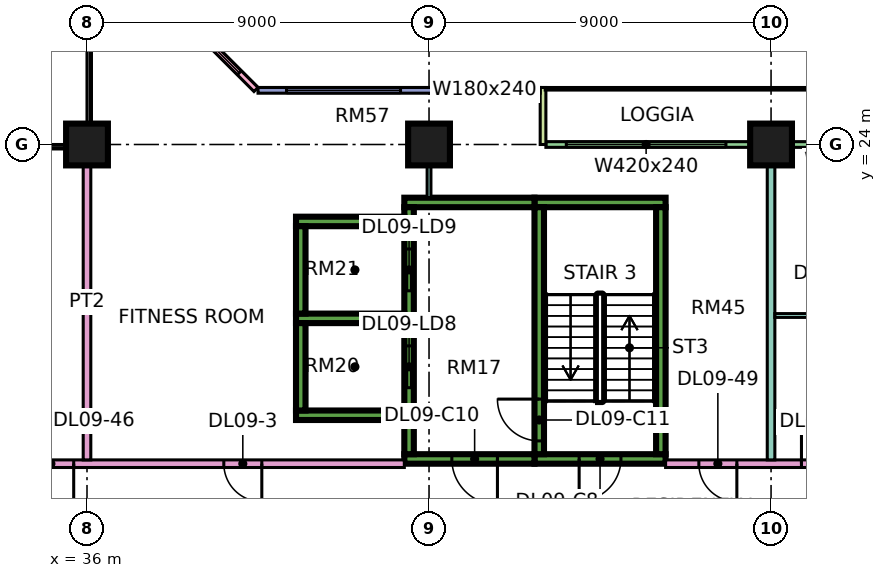
"""IFC4 building model, lengths in metres.
Left out: names, types, materials, properties, quantities, classifications, styles, units other than length and angle.
Written with IfcOpenShell. Run it as: python <this file> out.ifc"""

import sys

from ifc_helpers import new_model, si_unit, direction, frame, frame_2d, origin, origin_2d, place, context, subcontext, project, spatial, rectangle, extrude, element, fill, save


model = new_model("IFC4")
c1 = context("Model", 3, precision=1e-05, world=origin(), true_north=direction((0.0, 1.0)))
c2 = subcontext(c1, "Body", "Model", "MODEL_VIEW")
j1 = project(units=[si_unit("LENGTHUNIT", "METRE"), si_unit("PLANEANGLEUNIT", "RADIAN")], contexts=[c1])
p1 = place(None, origin())
s1 = spatial("IfcSite", under=j1, at=p1, CompositionType="ELEMENT")
p2 = place(p1, origin())
s2 = spatial("IfcBuilding", under=s1, at=p2, CompositionType="ELEMENT")
p3 = place(p2, frame((0.0, 0.0, 48.9)))
s3 = spatial("IfcBuildingStorey", under=s2, at=p3, CompositionType="ELEMENT", Elevation=48.9)
for number, where, z_axis, x_axis in (
    (1, (36.0, 24.0, 0.0), (0.0, 0.0, 1.0), (1.0, 0.0, 0.0)),
    (2, (45.0, 24.0, 0.0), (0.0, 0.0, 1.0), (1.0, 0.0, 0.0)),
    (3, (54.0, 24.0, 0.0), (0.0, 0.0, 1.0), (1.0, 0.0, 0.0)),
):
    element("IfcColumn", number, at=place(p3, frame(where, z_axis=z_axis, x_axis=x_axis)), inside=s3, PredefinedType="COLUMN", context=c2, shape_type="SweptSolid", body=[
        extrude(rectangle(XDim=1.1, YDim=1.1, at=origin_2d()), origin(), (0.0, 0.0, 1.0), 3.75),
    ])
p4 = place(p3, frame((47.775, 15.725, 0.0), z_axis=(0.0, 0.0, 1.0), x_axis=(1.0, 0.0, 0.0)))
e4 = element("IfcWall", 4, at=p4, inside=s3, PredefinedType="SHEAR", context=c2, shape_type="SweptSolid", body=[
    extrude(rectangle(XDim=3.45, YDim=0.25, at=frame_2d((1.725, 0.0))), origin(), (0.0, 0.0, 1.0), 3.75),
])
p5 = place(p4, frame((1.175, 0.0, 0.0)))
e5 = element("IfcOpeningElement", 5, at=p5, cuts=e4, PredefinedType="OPENING", context=c2, shape_type="SweptSolid", body=[
    extrude(rectangle(XDim=1.1, YDim=2.2, at=frame_2d((0.55, 1.1))), frame((0.0, 0.135, 0.0), z_axis=(0.0, -1.0, 0.0), x_axis=(1.0, 0.0, 0.0)), (0.0, 0.0, 1.0), 0.27),
])
p6 = place(p3, frame((47.775, 22.475, 0.0), z_axis=(0.0, 0.0, 1.0), x_axis=(1.0, 0.0, 0.0)))
e6 = element("IfcWall", 6, at=p6, inside=s3, PredefinedType="SHEAR", context=c2, shape_type="SweptSolid", body=[
    extrude(rectangle(XDim=3.45, YDim=0.25, at=frame_2d((1.725, 0.0))), origin(), (0.0, 0.0, 1.0), 3.75),
])
p7 = place(p3, frame((47.9, 15.85, 0.0), z_axis=(0.0, 0.0, 1.0), x_axis=(0.0, 1.0, 0.0)))
e7 = element("IfcWall", 7, at=p7, inside=s3, PredefinedType="SHEAR", context=c2, shape_type="SweptSolid", body=[
    extrude(rectangle(XDim=6.5, YDim=0.25, at=frame_2d((3.25, 0.0))), origin(), (0.0, 0.0, 1.0), 3.75),
])
p8 = place(p7, frame((0.35, 0.0, 0.0)))
e8 = element("IfcOpeningElement", 8, at=p8, cuts=e7, PredefinedType="OPENING", context=c2, shape_type="SweptSolid", body=[
    extrude(rectangle(XDim=1.1, YDim=2.2, at=frame_2d((0.55, 1.1))), frame((0.0, 0.135, 0.0), z_axis=(0.0, -1.0, 0.0), x_axis=(1.0, 0.0, 0.0)), (0.0, 0.0, 1.0), 0.27),
])
p9 = place(p3, frame((51.1, 15.85, 0.0), z_axis=(0.0, 0.0, 1.0), x_axis=(0.0, 1.0, 0.0)))
e9 = element("IfcWall", 9, at=p9, inside=s3, PredefinedType="SHEAR", context=c2, shape_type="SweptSolid", body=[
    extrude(rectangle(XDim=6.5, YDim=0.25, at=frame_2d((3.25, 0.0))), origin(), (0.0, 0.0, 1.0), 3.75),
])
p10 = place(p3, frame((44.35, 15.725, 0.0), z_axis=(0.0, 0.0, 1.0), x_axis=(1.0, 0.0, 0.0)))
e10 = element("IfcWall", 10, at=p10, inside=s3, PredefinedType="SHEAR", context=c2, shape_type="SweptSolid", body=[
    extrude(rectangle(XDim=3.425, YDim=0.25, at=frame_2d((1.712, 0.0))), origin(), (0.0, 0.0, 1.0), 3.75),
])
p11 = place(p10, frame((1.25, 0.0, 0.0)))
e11 = element("IfcOpeningElement", 11, at=p11, cuts=e10, PredefinedType="OPENING", context=c2, shape_type="SweptSolid", body=[
    extrude(rectangle(XDim=1.2, YDim=2.2, at=frame_2d((0.6, 1.1))), frame((0.0, 0.135, 0.0), z_axis=(0.0, -1.0, 0.0), x_axis=(1.0, 0.0, 0.0)), (0.0, 0.0, 1.0), 0.27),
])
p12 = place(p3, frame((44.35, 22.475, 0.0), z_axis=(0.0, 0.0, 1.0), x_axis=(1.0, 0.0, 0.0)))
e12 = element("IfcWall", 12, at=p12, inside=s3, PredefinedType="SHEAR", context=c2, shape_type="SweptSolid", body=[
    extrude(rectangle(XDim=3.425, YDim=0.25, at=frame_2d((1.712, 0.0))), origin(), (0.0, 0.0, 1.0), 3.75),
])
p13 = place(p3, frame((44.475, 15.85, 0.0), z_axis=(0.0, 0.0, 1.0), x_axis=(0.0, 1.0, 0.0)))
e13 = element("IfcWall", 13, at=p13, inside=s3, PredefinedType="SHEAR", context=c2, shape_type="SweptSolid", body=[
    extrude(rectangle(XDim=6.5, YDim=0.25, at=frame_2d((3.25, 0.0))), origin(), (0.0, 0.0, 1.0), 3.75),
])
p14 = place(p13, frame((1.75, 0.0, 0.0)))
e14 = element("IfcOpeningElement", 14, at=p14, cuts=e13, PredefinedType="OPENING", context=c2, shape_type="SweptSolid", body=[
    extrude(rectangle(XDim=1.1, YDim=2.2, at=frame_2d((0.55, 1.1))), frame((0.0, 0.135, 0.0), z_axis=(0.0, -1.0, 0.0), x_axis=(1.0, 0.0, 0.0)), (0.0, 0.0, 1.0), 0.27),
])
p15 = place(p13, frame((4.3, 0.0, 0.0)))
e15 = element("IfcOpeningElement", 15, at=p15, cuts=e13, PredefinedType="OPENING", context=c2, shape_type="SweptSolid", body=[
    extrude(rectangle(XDim=1.1, YDim=2.2, at=frame_2d((0.55, 1.1))), frame((0.0, 0.135, 0.0), z_axis=(0.0, -1.0, 0.0), x_axis=(1.0, 0.0, 0.0)), (0.0, 0.0, 1.0), 0.27),
])
for number, where, z_axis, x_axis in (
    (16, (41.5, 16.875, 0.0), (0.0, 0.0, 1.0), (1.0, 0.0, 0.0)),
    (17, (41.5, 19.425, 0.0), (0.0, 0.0, 1.0), (1.0, 0.0, 0.0)),
    (18, (41.5, 21.975, 0.0), (0.0, 0.0, 1.0), (1.0, 0.0, 0.0)),
):
    element("IfcWall", number, at=place(p3, frame(where, z_axis=z_axis, x_axis=x_axis)), inside=s3, PredefinedType="SHEAR", context=c2, shape_type="SweptSolid", body=[
        extrude(rectangle(XDim=2.85, YDim=0.25, at=frame_2d((1.425, 0.0))), origin(), (0.0, 0.0, 1.0), 3.75),
    ])
for number, where, z_axis, x_axis in (
    (19, (41.625, 17.0, 0.0), (0.0, 0.0, 1.0), (0.0, 1.0, 0.0)),
    (20, (41.625, 19.55, 0.0), (0.0, 0.0, 1.0), (0.0, 1.0, 0.0)),
):
    element("IfcWall", number, at=place(p3, frame(where, z_axis=z_axis, x_axis=x_axis)), inside=s3, PredefinedType="SHEAR", context=c2, shape_type="SweptSolid", body=[
        extrude(rectangle(XDim=2.3, YDim=0.25, at=frame_2d((1.15, 0.0))), origin(), (0.0, 0.0, 1.0), 3.75),
    ])
p16 = place(p3, frame((59.925, 24.0, 0.0), z_axis=(0.0, 0.0, 1.0), x_axis=(-1.0, 0.0, 0.0)))
e21 = element("IfcWall", 21, at=p16, inside=s3, PredefinedType="SOLIDWALL", context=c2, shape_type="SweptSolid", body=[
    extrude(rectangle(XDim=11.85, YDim=0.15, at=frame_2d((5.925, 0.0))), origin(), (0.0, 0.0, 1.0), 3.35),
])
p17 = place(p16, frame((0.562, 0.0, 0.45)))
e22 = element("IfcOpeningElement", 22, at=p17, cuts=e21, PredefinedType="OPENING", context=c2, shape_type="SweptSolid", body=[
    extrude(rectangle(XDim=1.8, YDim=2.4, at=frame_2d((0.9, 1.2))), frame((0.0, 0.085, 0.0), z_axis=(0.0, -1.0, 0.0), x_axis=(1.0, 0.0, 0.0)), (0.0, 0.0, 1.0), 0.17),
])
p18 = place(p16, frame((3.5, 0.0, 0.45)))
e23 = element("IfcOpeningElement", 23, at=p18, cuts=e21, PredefinedType="OPENING", context=c2, shape_type="SweptSolid", body=[
    extrude(rectangle(XDim=1.2, YDim=2.4, at=frame_2d((0.6, 1.2))), frame((0.0, 0.085, 0.0), z_axis=(0.0, -1.0, 0.0), x_axis=(1.0, 0.0, 0.0)), (0.0, 0.0, 1.0), 0.17),
])
p19 = place(p16, frame((7.113, 0.0, 0.45)))
e24 = element("IfcOpeningElement", 24, at=p19, cuts=e21, PredefinedType="OPENING", context=c2, shape_type="SweptSolid", body=[
    extrude(rectangle(XDim=4.2, YDim=2.4, at=frame_2d((2.1, 1.2))), frame((0.0, 0.085, 0.0), z_axis=(0.0, -1.0, 0.0), x_axis=(1.0, 0.0, 0.0)), (0.0, 0.0, 1.0), 0.17),
])
p20 = place(p3, frame((48.0, 25.5, 0.0), z_axis=(0.0, 0.0, 1.0), x_axis=(0.0, -1.0, 0.0)))
e25 = element("IfcWall", 25, at=p20, inside=s3, PredefinedType="SOLIDWALL", context=c2, shape_type="SweptSolid", body=[
    extrude(rectangle(XDim=1.5, YDim=0.15, at=frame_2d((0.75, 0.0))), origin(), (0.0, 0.0, 1.0), 3.35),
])
p21 = place(p3, frame((47.925, 25.425, 0.0), z_axis=(0.0, 0.0, 1.0), x_axis=(-1.0, 0.0, 0.0)))
e26 = element("IfcWall", 26, at=p21, inside=s3, PredefinedType="SOLIDWALL", context=c2, shape_type="SweptSolid", body=[
    extrude(rectangle(XDim=7.425, YDim=0.15, at=frame_2d((3.712, 0.0))), origin(), (0.0, 0.0, 1.0), 3.35),
])
p22 = place(p21, frame((0.562, 0.0, 0.45)))
e27 = element("IfcOpeningElement", 27, at=p22, cuts=e26, PredefinedType="OPENING", context=c2, shape_type="SweptSolid", body=[
    extrude(rectangle(XDim=1.8, YDim=2.4, at=frame_2d((0.9, 1.2))), frame((0.0, 0.085, 0.0), z_axis=(0.0, -1.0, 0.0), x_axis=(1.0, 0.0, 0.0)), (0.0, 0.0, 1.0), 0.17),
])
p23 = place(p21, frame((3.675, 0.0, 0.45)))
e28 = element("IfcOpeningElement", 28, at=p23, cuts=e26, PredefinedType="OPENING", context=c2, shape_type="SweptSolid", body=[
    extrude(rectangle(XDim=3.0, YDim=2.4, at=frame_2d((1.5, 1.2))), frame((0.0, 0.085, 0.0), z_axis=(0.0, -1.0, 0.0), x_axis=(1.0, 0.0, 0.0)), (0.0, 0.0, 1.0), 0.17),
])
p24 = place(p3, frame((40.447, 25.447, 0.0), z_axis=(0.0, 0.0, 1.0), x_axis=(-0.707106781187, 0.707106781187, 0.0)))
e29 = element("IfcWall", 29, at=p24, inside=s3, PredefinedType="SOLIDWALL", context=c2, shape_type="SweptSolid", body=[
    extrude(rectangle(XDim=4.243, YDim=0.15, at=frame_2d((2.121, 0.0))), origin(), (0.0, 0.0, 1.0), 3.35),
])
p25 = place(p24, frame((0.621, 0.0, 0.45)))
e30 = element("IfcOpeningElement", 30, at=p25, cuts=e29, PredefinedType="OPENING", context=c2, shape_type="SweptSolid", body=[
    extrude(rectangle(XDim=3.0, YDim=2.4, at=frame_2d((1.5, 1.2))), frame((0.0, 0.085, 0.0), z_axis=(0.0, -1.0, 0.0), x_axis=(1.0, 0.0, 0.0)), (0.0, 0.0, 1.0), 0.17),
])
p26 = place(p3, frame((34.0, 15.6, 0.0), z_axis=(0.0, 0.0, 1.0), x_axis=(1.0, 0.0, 0.0)))
e31 = element("IfcWall", 31, at=p26, inside=s3, PredefinedType="PARTITIONING", context=c2, shape_type="SweptSolid", body=[
    extrude(rectangle(XDim=10.35, YDim=0.2, at=frame_2d((5.175, 0.0))), origin(), (0.0, 0.0, 1.0), 3.35),
])
p27 = place(p26, frame((5.6, 0.0, 0.0)))
e32 = element("IfcOpeningElement", 32, at=p27, cuts=e31, PredefinedType="OPENING", context=c2, shape_type="SweptSolid", body=[
    extrude(rectangle(XDim=1.0, YDim=2.1, at=frame_2d((0.5, 1.05))), frame((0.0, 0.11, 0.0), z_axis=(0.0, -1.0, 0.0), x_axis=(1.0, 0.0, 0.0)), (0.0, 0.0, 1.0), 0.22),
])
p28 = place(p26, frame((0.45, 0.0, 0.0)))
e33 = element("IfcOpeningElement", 33, at=p28, cuts=e31, PredefinedType="OPENING", context=c2, shape_type="SweptSolid", body=[
    extrude(rectangle(XDim=1.2, YDim=2.1, at=frame_2d((0.6, 1.05))), frame((0.0, 0.11, 0.0), z_axis=(0.0, -1.0, 0.0), x_axis=(1.0, 0.0, 0.0)), (0.0, 0.0, 1.0), 0.22),
])
p29 = place(p3, frame((36.0, 15.7, 0.0), z_axis=(0.0, 0.0, 1.0), x_axis=(0.0, 1.0, 0.0)))
e34 = element("IfcWall", 34, at=p29, inside=s3, PredefinedType="PARTITIONING", context=c2, shape_type="SweptSolid", body=[
    extrude(rectangle(XDim=8.3, YDim=0.2, at=frame_2d((4.15, 0.0))), origin(), (0.0, 0.0, 1.0), 3.35),
])
p30 = place(p3, frame((45.0, 22.6, 0.0), z_axis=(0.0, 0.0, 1.0), x_axis=(0.0, 1.0, 0.0)))
e35 = element("IfcWall", 35, at=p30, inside=s3, PredefinedType="PARTITIONING", context=c2, shape_type="SweptSolid", body=[
    extrude(rectangle(XDim=1.4, YDim=0.1, at=frame_2d((0.7, 0.0))), origin(), (0.0, 0.0, 1.0), 3.35),
])
p31 = place(p3, frame((51.225, 15.6, 0.0), z_axis=(0.0, 0.0, 1.0), x_axis=(1.0, 0.0, 0.0)))
e36 = element("IfcWall", 36, at=p31, inside=s3, PredefinedType="PARTITIONING", context=c2, shape_type="SweptSolid", body=[
    extrude(rectangle(XDim=22.125, YDim=0.2, at=frame_2d((11.062, 0.0))), origin(), (0.0, 0.0, 1.0), 3.35),
])
p32 = place(p31, frame((3.575, 0.0, 0.0)))
e37 = element("IfcOpeningElement", 37, at=p32, cuts=e36, PredefinedType="OPENING", context=c2, shape_type="SweptSolid", body=[
    extrude(rectangle(XDim=1.0, YDim=2.1, at=frame_2d((0.5, 1.05))), frame((0.0, 0.11, 0.0), z_axis=(0.0, -1.0, 0.0), x_axis=(1.0, 0.0, 0.0)), (0.0, 0.0, 1.0), 0.22),
])
p33 = place(p31, frame((0.875, 0.0, 0.0)))
e38 = element("IfcOpeningElement", 38, at=p33, cuts=e36, PredefinedType="OPENING", context=c2, shape_type="SweptSolid", body=[
    extrude(rectangle(XDim=1.0, YDim=2.1, at=frame_2d((0.5, 1.05))), frame((0.0, 0.11, 0.0), z_axis=(0.0, -1.0, 0.0), x_axis=(1.0, 0.0, 0.0)), (0.0, 0.0, 1.0), 0.22),
])
p34 = place(p3, frame((54.0, 15.7, 0.0), z_axis=(0.0, 0.0, 1.0), x_axis=(0.0, 1.0, 0.0)))
e39 = element("IfcWall", 39, at=p34, inside=s3, PredefinedType="PARTITIONING", context=c2, shape_type="SweptSolid", body=[
    extrude(rectangle(XDim=8.226, YDim=0.2, at=frame_2d((4.113, 0.0))), origin(), (0.0, 0.0, 1.0), 3.35),
])
p35 = place(p3, frame((54.1, 19.5, 0.0), z_axis=(0.0, 0.0, 1.0), x_axis=(1.0, 0.0, 0.0)))
e40 = element("IfcWall", 40, at=p35, inside=s3, PredefinedType="PARTITIONING", context=c2, shape_type="SweptSolid", body=[
    extrude(rectangle(XDim=8.95, YDim=0.1, at=frame_2d((4.475, 0.0))), origin(), (0.0, 0.0, 1.0), 3.35),
])
p36 = place(p35, frame((0.95, 0.0, 0.0)))
e41 = element("IfcOpeningElement", 41, at=p36, cuts=e40, PredefinedType="OPENING", context=c2, shape_type="SweptSolid", body=[
    extrude(rectangle(XDim=0.9, YDim=2.1, at=frame_2d((0.45, 1.05))), frame((0.0, 0.06, 0.0), z_axis=(0.0, -1.0, 0.0), x_axis=(1.0, 0.0, 0.0)), (0.0, 0.0, 1.0), 0.12),
])
p37 = place(p35, frame((3.95, 0.0, 0.0)))
e42 = element("IfcOpeningElement", 42, at=p37, cuts=e40, PredefinedType="OPENING", context=c2, shape_type="SweptSolid", body=[
    extrude(rectangle(XDim=0.9, YDim=2.1, at=frame_2d((0.45, 1.05))), frame((0.0, 0.06, 0.0), z_axis=(0.0, -1.0, 0.0), x_axis=(1.0, 0.0, 0.0)), (0.0, 0.0, 1.0), 0.12),
])
p38 = place(p35, frame((6.95, 0.0, 0.0)))
e43 = element("IfcOpeningElement", 43, at=p38, cuts=e40, PredefinedType="OPENING", context=c2, shape_type="SweptSolid", body=[
    extrude(rectangle(XDim=0.9, YDim=2.1, at=frame_2d((0.45, 1.05))), frame((0.0, 0.06, 0.0), z_axis=(0.0, -1.0, 0.0), x_axis=(1.0, 0.0, 0.0)), (0.0, 0.0, 1.0), 0.12),
])
p39 = place(p19, origin())
e44 = element("IfcWindow", 44, at=p39, inside=s3, PartitioningType="SINGLE_PANEL", PredefinedType="WINDOW", context=c2, shape_type="SweptSolid", body=[
    extrude(rectangle(XDim=4.2, YDim=2.4, at=frame_2d((2.1, 1.2))), frame((0.0, 0.03, 0.0), z_axis=(0.0, -1.0, 0.0), x_axis=(1.0, 0.0, 0.0)), (0.0, 0.0, 1.0), 0.06),
])
fill(e24, e44)
p40 = place(p22, origin())
e45 = element("IfcWindow", 45, at=p40, inside=s3, PartitioningType="SINGLE_PANEL", PredefinedType="WINDOW", context=c2, shape_type="SweptSolid", body=[
    extrude(rectangle(XDim=1.8, YDim=2.4, at=frame_2d((0.9, 1.2))), frame((0.0, 0.03, 0.0), z_axis=(0.0, -1.0, 0.0), x_axis=(1.0, 0.0, 0.0)), (0.0, 0.0, 1.0), 0.06),
])
fill(e27, e45)
p41 = place(p23, origin())
e46 = element("IfcWindow", 46, at=p41, inside=s3, PartitioningType="SINGLE_PANEL", PredefinedType="WINDOW", context=c2, shape_type="SweptSolid", body=[
    extrude(rectangle(XDim=3.0, YDim=2.4, at=frame_2d((1.5, 1.2))), frame((0.0, 0.03, 0.0), z_axis=(0.0, -1.0, 0.0), x_axis=(1.0, 0.0, 0.0)), (0.0, 0.0, 1.0), 0.06),
])
fill(e28, e46)
p42 = place(p25, origin())
e47 = element("IfcWindow", 47, at=p42, inside=s3, PartitioningType="SINGLE_PANEL", PredefinedType="WINDOW", context=c2, shape_type="SweptSolid", body=[
    extrude(rectangle(XDim=3.0, YDim=2.4, at=frame_2d((1.5, 1.2))), frame((0.0, 0.03, 0.0), z_axis=(0.0, -1.0, 0.0), x_axis=(1.0, 0.0, 0.0)), (0.0, 0.0, 1.0), 0.06),
])
fill(e30, e47)
p43 = place(p5, frame((1.1, 0.0, 0.0), z_axis=(0.0, 0.0, 1.0), x_axis=(-1.0, 0.0, 0.0)))
e48 = element("IfcDoor", 48, at=p43, inside=s3, OperationType="SINGLE_SWING_LEFT", PredefinedType="DOOR", context=c2, shape_type="SweptSolid", body=[
    extrude(rectangle(XDim=1.1, YDim=2.2, at=frame_2d((0.55, 1.1))), frame((0.0, 0.025, 0.0), z_axis=(0.0, -1.0, 0.0), x_axis=(1.0, 0.0, 0.0)), (0.0, 0.0, 1.0), 0.05),
])
fill(e5, e48)
p44 = place(p11, origin())
e49 = element("IfcDoor", 49, at=p44, inside=s3, OperationType="SINGLE_SWING_RIGHT", PredefinedType="DOOR", context=c2, shape_type="SweptSolid", body=[
    extrude(rectangle(XDim=1.2, YDim=2.2, at=frame_2d((0.6, 1.1))), frame((0.0, 0.025, 0.0), z_axis=(0.0, -1.0, 0.0), x_axis=(1.0, 0.0, 0.0)), (0.0, 0.0, 1.0), 0.05),
])
fill(e11, e49)
p45 = place(p8, frame((1.1, 0.0, 0.0), z_axis=(0.0, 0.0, 1.0), x_axis=(-1.0, 0.0, 0.0)))
e50 = element("IfcDoor", 50, at=p45, inside=s3, OperationType="SINGLE_SWING_RIGHT", PredefinedType="DOOR", context=c2, shape_type="SweptSolid", body=[
    extrude(rectangle(XDim=1.1, YDim=2.2, at=frame_2d((0.55, 1.1))), frame((0.0, 0.025, 0.0), z_axis=(0.0, -1.0, 0.0), x_axis=(1.0, 0.0, 0.0)), (0.0, 0.0, 1.0), 0.05),
])
fill(e8, e50)
p46 = place(p14, origin())
e51 = element("IfcDoor", 51, at=p46, inside=s3, OperationType="DOUBLE_DOOR_SLIDING", PredefinedType="DOOR", context=c2, shape_type="SweptSolid", body=[
    extrude(rectangle(XDim=1.1, YDim=2.2, at=frame_2d((0.55, 1.1))), frame((0.0, 0.025, 0.0), z_axis=(0.0, -1.0, 0.0), x_axis=(1.0, 0.0, 0.0)), (0.0, 0.0, 1.0), 0.05),
])
fill(e14, e51)
p47 = place(p15, origin())
e52 = element("IfcDoor", 52, at=p47, inside=s3, OperationType="DOUBLE_DOOR_SLIDING", PredefinedType="DOOR", context=c2, shape_type="SweptSolid", body=[
    extrude(rectangle(XDim=1.1, YDim=2.2, at=frame_2d((0.55, 1.1))), frame((0.0, 0.025, 0.0), z_axis=(0.0, -1.0, 0.0), x_axis=(1.0, 0.0, 0.0)), (0.0, 0.0, 1.0), 0.05),
])
fill(e15, e52)
p48 = place(p27, origin())
e53 = element("IfcDoor", 53, at=p48, inside=s3, OperationType="SINGLE_SWING_RIGHT", PredefinedType="DOOR", context=c2, shape_type="SweptSolid", body=[
    extrude(rectangle(XDim=1.0, YDim=2.1, at=frame_2d((0.5, 1.05))), frame((0.0, 0.025, 0.0), z_axis=(0.0, -1.0, 0.0), x_axis=(1.0, 0.0, 0.0)), (0.0, 0.0, 1.0), 0.05),
])
fill(e32, e53)
p49 = place(p32, origin())
e54 = element("IfcDoor", 54, at=p49, inside=s3, OperationType="SINGLE_SWING_LEFT", PredefinedType="DOOR", context=c2, shape_type="SweptSolid", body=[
    extrude(rectangle(XDim=1.0, YDim=2.1, at=frame_2d((0.5, 1.05))), frame((0.0, 0.025, 0.0), z_axis=(0.0, -1.0, 0.0), x_axis=(1.0, 0.0, 0.0)), (0.0, 0.0, 1.0), 0.05),
])
fill(e37, e54)
p50 = place(p28, origin())
e55 = element("IfcDoor", 55, at=p50, inside=s3, OperationType="SINGLE_SWING_RIGHT", PredefinedType="DOOR", context=c2, shape_type="SweptSolid", body=[
    extrude(rectangle(XDim=1.2, YDim=2.1, at=frame_2d((0.6, 1.05))), frame((0.0, 0.025, 0.0), z_axis=(0.0, -1.0, 0.0), x_axis=(1.0, 0.0, 0.0)), (0.0, 0.0, 1.0), 0.05),
])
fill(e33, e55)
p51 = place(p33, origin())
e56 = element("IfcDoor", 56, at=p51, inside=s3, OperationType="SINGLE_SWING_RIGHT", PredefinedType="DOOR", context=c2, shape_type="SweptSolid", body=[
    extrude(rectangle(XDim=1.0, YDim=2.1, at=frame_2d((0.5, 1.05))), frame((0.0, 0.025, 0.0), z_axis=(0.0, -1.0, 0.0), x_axis=(1.0, 0.0, 0.0)), (0.0, 0.0, 1.0), 0.05),
])
fill(e38, e56)
save(model, sys.argv[1])
